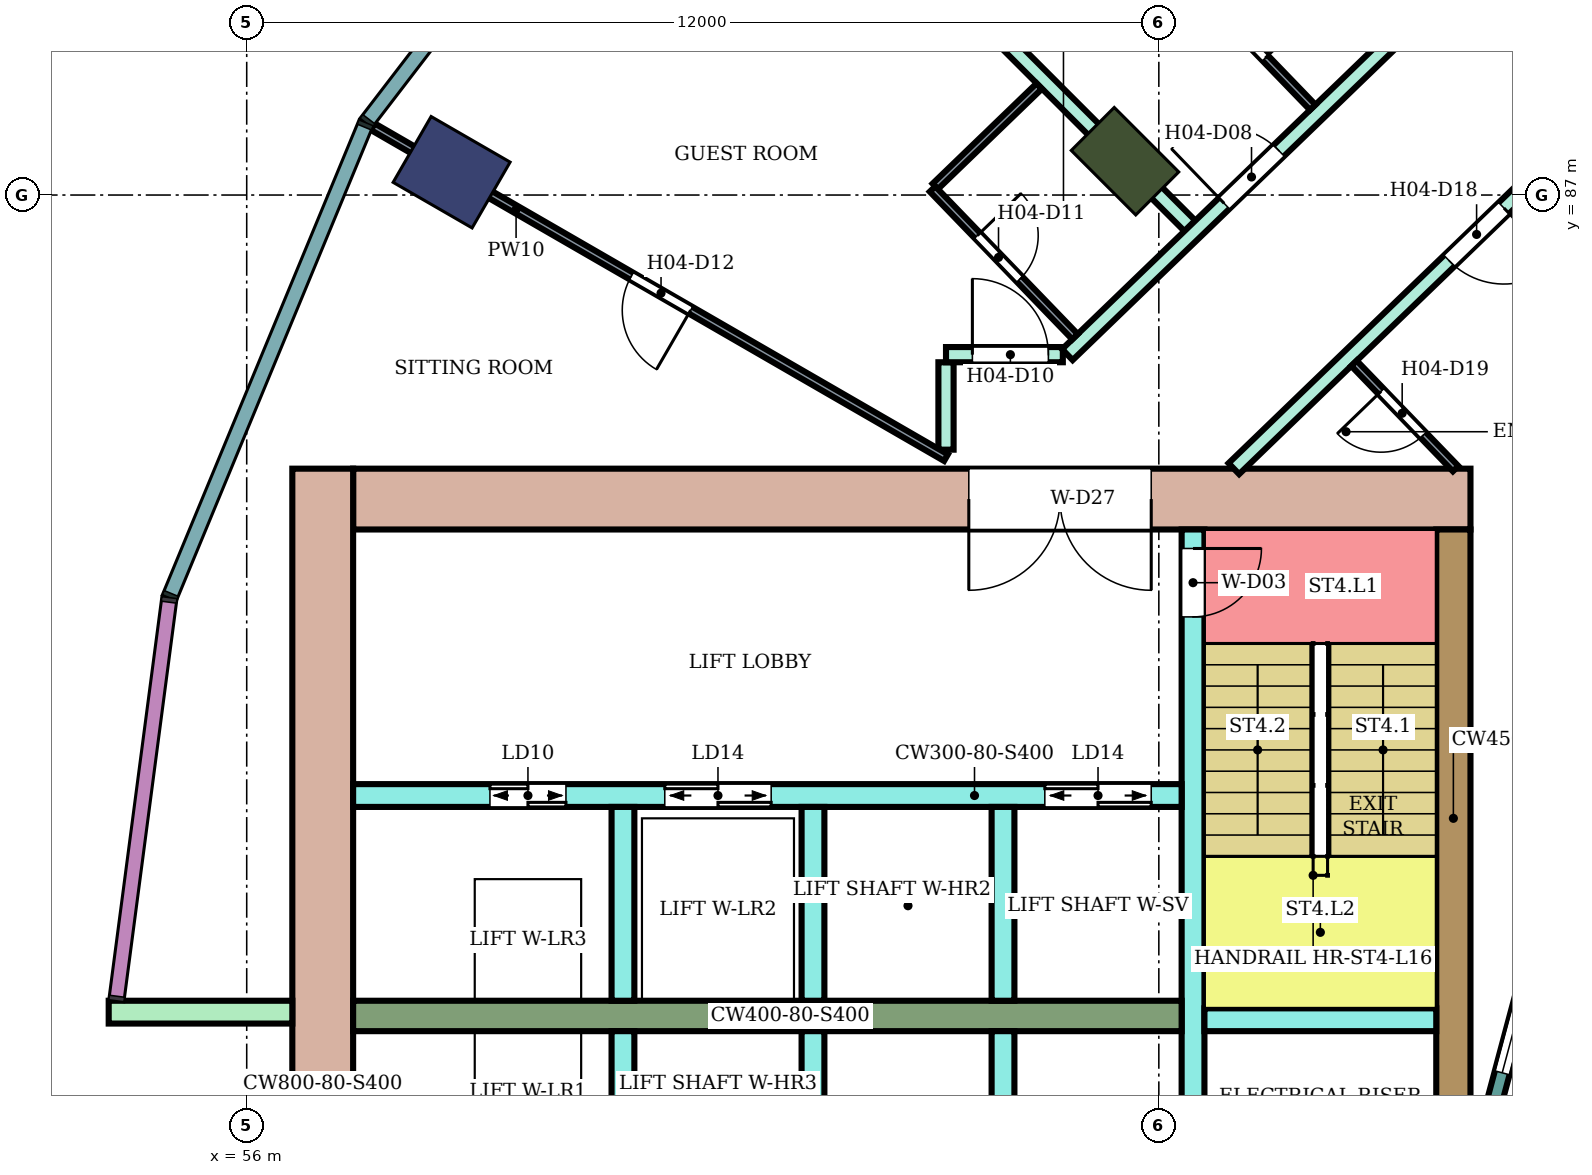
"""IFC4 building model, lengths in metres.
Left out: names, types, materials, properties, quantities, classifications, styles, units other than length and angle.
Written with IfcOpenShell. Run it as: python <this file> out.ifc"""

import sys

from ifc_helpers import new_model, si_unit, direction, frame, frame_2d, origin, origin_2d, place, context, subcontext, project, spatial, rectangle, extrude, element, fill, save


model = new_model("IFC4")
c1 = context("Model", 3, precision=1e-05, world=origin(), true_north=direction((0.0, 1.0)))
c2 = subcontext(c1, "Body", "Model", "MODEL_VIEW")
j1 = project(units=[si_unit("LENGTHUNIT", "METRE"), si_unit("PLANEANGLEUNIT", "RADIAN")], contexts=[c1])
p1 = place(None, origin())
s1 = spatial("IfcSite", under=j1, at=p1, CompositionType="ELEMENT")
p2 = place(p1, origin())
s2 = spatial("IfcBuilding", under=s1, at=p2, CompositionType="ELEMENT")
p3 = place(p2, frame((0.0, 0.0, 70.6)))
s3 = spatial("IfcBuildingStorey", under=s2, at=p3, CompositionType="ELEMENT", Elevation=70.6)
p4 = place(p3, frame((58.696, 87.3, 0.0), z_axis=(0.0, 0.0, 1.0), x_axis=(-0.866025403784, 0.5, 0.0)))
e1 = element("IfcColumn", 1, at=p4, inside=s3, PredefinedType="COLUMN", context=c2, shape_type="SweptSolid", body=[
    extrude(rectangle(XDim=1.2, YDim=1.0, at=origin_2d()), origin(), (0.0, 0.0, 1.0), 3.8),
])
p5 = place(p3, frame((67.555, 87.445, 0.0), z_axis=(0.0, 0.0, 1.0), x_axis=(-0.707106781187, 0.707106781187, 0.0)))
e2 = element("IfcColumn", 2, at=p5, inside=s3, PredefinedType="COLUMN", context=c2, shape_type="SweptSolid", body=[
    extrude(rectangle(XDim=1.2, YDim=0.8, at=origin_2d()), origin(), (0.0, 0.0, 1.0), 3.8),
])
p6 = place(p3, frame((72.1, 83.0, 0.0), z_axis=(0.0, 0.0, 1.0), x_axis=(-1.0, 0.0, 0.0)))
e3 = element("IfcWall", 3, at=p6, inside=s3, PredefinedType="SHEAR", context=c2, shape_type="SweptSolid", body=[
    extrude(rectangle(XDim=14.7, YDim=0.8, at=frame_2d((7.35, 0.0))), origin(), (0.0, 0.0, 1.0), 3.4),
])
p7 = place(p6, frame((4.2, 0.0, 0.0)))
e4 = element("IfcOpeningElement", 4, at=p7, cuts=e3, PredefinedType="OPENING", context=c2, shape_type="SweptSolid", body=[
    extrude(rectangle(XDim=2.4, YDim=2.4, at=frame_2d((1.2, 1.2))), frame((0.0, 0.41, 0.0), z_axis=(0.0, -1.0, 0.0), x_axis=(1.0, 0.0, 0.0)), (0.0, 0.0, 1.0), 0.82),
])
p8 = place(p3, frame((71.875, 82.6, 0.0), z_axis=(0.0, 0.0, 1.0), x_axis=(0.0, -1.0, 0.0)))
e5 = element("IfcWall", 5, at=p8, inside=s3, PredefinedType="SHEAR", context=c2, shape_type="SweptSolid", body=[
    extrude(rectangle(XDim=7.6, YDim=0.45, at=frame_2d((3.8, 0.0))), origin(), (0.0, 0.0, 1.0), 3.4),
])
p9 = place(p3, frame((57.0, 83.4, 0.0), z_axis=(0.0, 0.0, 1.0), x_axis=(0.0, -1.0, 0.0)))
e6 = element("IfcWall", 6, at=p9, inside=s3, PredefinedType="SHEAR", context=c2, shape_type="SweptSolid", body=[
    extrude(rectangle(XDim=16.8, YDim=0.8, at=frame_2d((8.4, 0.0))), origin(), (0.0, 0.0, 1.0), 3.4),
])
p10 = place(p3, frame((68.45, 82.6, 0.0), z_axis=(0.0, 0.0, 1.0), x_axis=(0.0, -1.0, 0.0)))
e7 = element("IfcWall", 7, at=p10, inside=s3, PredefinedType="SHEAR", context=c2, shape_type="SweptSolid", body=[
    extrude(rectangle(XDim=7.6, YDim=0.3, at=frame_2d((3.8, 0.0))), origin(), (0.0, 0.0, 1.0), 3.4),
])
p11 = place(p10, frame((0.25, 0.0, 0.0)))
e8 = element("IfcOpeningElement", 8, at=p11, cuts=e7, PredefinedType="OPENING", context=c2, shape_type="SweptSolid", body=[
    extrude(rectangle(XDim=0.9, YDim=2.1, at=frame_2d((0.45, 1.05))), frame((0.0, 0.16, 0.0), z_axis=(0.0, -1.0, 0.0), x_axis=(1.0, 0.0, 0.0)), (0.0, 0.0, 1.0), 0.32),
])
p12 = place(p3, frame((71.65, 76.15, 0.0), z_axis=(0.0, 0.0, 1.0), x_axis=(-1.0, 0.0, 0.0)))
e9 = element("IfcWall", 9, at=p12, inside=s3, PredefinedType="SHEAR", context=c2, shape_type="SweptSolid", body=[
    extrude(rectangle(XDim=3.05, YDim=0.3, at=frame_2d((1.525, 0.0))), origin(), (0.0, 0.0, 1.0), 3.4),
])
p13 = place(p3, frame((68.3, 76.2, 0.0), z_axis=(0.0, 0.0, 1.0), x_axis=(-1.0, 0.0, 0.0)))
e10 = element("IfcWall", 10, at=p13, inside=s3, PredefinedType="SHEAR", context=c2, shape_type="SweptSolid", body=[
    extrude(rectangle(XDim=10.9, YDim=0.4, at=frame_2d((5.45, 0.0))), origin(), (0.0, 0.0, 1.0), 3.4),
])
p14 = place(p3, frame((68.3, 79.1, 0.0), z_axis=(0.0, 0.0, 1.0), x_axis=(-1.0, 0.0, 0.0)))
e11 = element("IfcWall", 11, at=p14, inside=s3, PredefinedType="SHEAR", context=c2, shape_type="SweptSolid", body=[
    extrude(rectangle(XDim=10.9, YDim=0.3, at=frame_2d((5.45, 0.0))), origin(), (0.0, 0.0, 1.0), 3.4),
])
p15 = place(p14, frame((0.4, 0.0, 0.0)))
e12 = element("IfcOpeningElement", 12, at=p15, cuts=e11, PredefinedType="OPENING", context=c2, shape_type="SweptSolid", body=[
    extrude(rectangle(XDim=1.4, YDim=2.1, at=frame_2d((0.7, 1.05))), frame((0.0, 0.16, 0.0), z_axis=(0.0, -1.0, 0.0), x_axis=(1.0, 0.0, 0.0)), (0.0, 0.0, 1.0), 0.32),
])
p16 = place(p14, frame((5.4, 0.0, 0.0)))
e13 = element("IfcOpeningElement", 13, at=p16, cuts=e11, PredefinedType="OPENING", context=c2, shape_type="SweptSolid", body=[
    extrude(rectangle(XDim=1.4, YDim=2.1, at=frame_2d((0.7, 1.05))), frame((0.0, 0.16, 0.0), z_axis=(0.0, -1.0, 0.0), x_axis=(1.0, 0.0, 0.0)), (0.0, 0.0, 1.0), 0.32),
])
p17 = place(p14, frame((8.1, 0.0, 0.0)))
e14 = element("IfcOpeningElement", 14, at=p17, cuts=e11, PredefinedType="OPENING", context=c2, shape_type="SweptSolid", body=[
    extrude(rectangle(XDim=1.0, YDim=2.1, at=frame_2d((0.5, 1.05))), frame((0.0, 0.16, 0.0), z_axis=(0.0, -1.0, 0.0), x_axis=(1.0, 0.0, 0.0)), (0.0, 0.0, 1.0), 0.32),
])
for number, where, z_axis, x_axis in (
    (15, (65.95, 76.0, 0.0), (0.0, 0.0, 1.0), (0.0, -1.0, 0.0)),
    (16, (63.45, 76.0, 0.0), (0.0, 0.0, 1.0), (0.0, -1.0, 0.0)),
    (17, (60.95, 76.0, 0.0), (0.0, 0.0, 1.0), (0.0, -1.0, 0.0)),
    (18, (65.95, 78.95, 0.0), (0.0, 0.0, 1.0), (0.0, -1.0, 0.0)),
    (19, (63.45, 78.95, 0.0), (0.0, 0.0, 1.0), (0.0, -1.0, 0.0)),
    (20, (60.95, 78.95, 0.0), (0.0, 0.0, 1.0), (0.0, -1.0, 0.0)),
):
    element("IfcWall", number, at=place(p3, frame(where, z_axis=z_axis, x_axis=x_axis)), inside=s3, PredefinedType="SHEAR", context=c2, shape_type="SweptSolid", body=[
        extrude(rectangle(XDim=2.55, YDim=0.3, at=frame_2d((1.275, 0.0))), origin(), (0.0, 0.0, 1.0), 3.4),
    ])
p18 = place(p3, frame((56.6, 76.25, 0.0), z_axis=(0.0, 0.0, 1.0), x_axis=(-1.0, 0.0, 0.0)))
e21 = element("IfcWall", 21, at=p18, inside=s3, PredefinedType="NOTDEFINED", context=c2, shape_type="SweptSolid", body=[
    extrude(rectangle(XDim=2.416, YDim=0.3, at=frame_2d((1.208, 0.0))), origin(), (0.0, 0.0, 1.0), 3.8),
])
p19 = place(p3, frame((73.415, 78.802, 0.0), z_axis=(0.0, 0.0, 1.0), x_axis=(-0.258789828301, -0.965933654434, 0.0)))
e22 = element("IfcWall", 22, at=p19, inside=s3, PredefinedType="NOTDEFINED", context=c2, shape_type="SweptSolid", body=[
    extrude(rectangle(XDim=3.936, YDim=0.2, at=frame_2d((1.968, 0.0))), origin(), (0.0, 0.0, 1.0), 3.8),
])
p20 = place(p19, frame((0.468, 0.0, 0.9)))
e23 = element("IfcOpeningElement", 23, at=p20, cuts=e22, PredefinedType="OPENING", context=c2, shape_type="SweptSolid", body=[
    extrude(rectangle(XDim=3.0, YDim=2.3, at=frame_2d((1.5, 1.15))), frame((0.0, 0.11, 0.0), z_axis=(0.0, -1.0, 0.0), x_axis=(1.0, 0.0, 0.0)), (0.0, 0.0, 1.0), 0.22),
])
p21 = place(p3, frame((63.598, 91.407, 0.0), z_axis=(0.0, 0.0, 1.0), x_axis=(0.706981202484, -0.707232337591, 0.0)))
e24 = element("IfcWall", 24, at=p21, inside=s3, PredefinedType="PARTITIONING", context=c2, shape_type="SweptSolid", body=[
    extrude(rectangle(XDim=6.805, YDim=0.2, at=frame_2d((3.402, 0.0))), origin(), (0.0, 0.0, 1.0), 3.35),
])
p22 = place(p3, frame((65.2, 83.65, 0.0), z_axis=(0.0, 0.0, 1.0), x_axis=(0.0, 1.0, 0.0)))
e25 = element("IfcWall", 25, at=p22, inside=s3, PredefinedType="PARTITIONING", context=c2, shape_type="SweptSolid", body=[
    extrude(rectangle(XDim=1.15, YDim=0.2, at=frame_2d((0.575, 0.0))), origin(), (0.0, 0.0, 1.0), 3.35),
])
p23 = place(p3, frame((65.2, 84.9, 0.0), z_axis=(0.0, 0.0, 1.0), x_axis=(1.0, 0.0, 0.0)))
e26 = element("IfcWall", 26, at=p23, inside=s3, PredefinedType="PARTITIONING", context=c2, shape_type="SweptSolid", body=[
    extrude(rectangle(XDim=1.537, YDim=0.2, at=frame_2d((0.769, 0.0))), origin(), (0.0, 0.0, 1.0), 3.35),
])
p24 = place(p23, frame((0.347, 0.0, 0.0)))
e27 = element("IfcOpeningElement", 27, at=p24, cuts=e26, PredefinedType="OPENING", context=c2, shape_type="SweptSolid", body=[
    extrude(rectangle(XDim=1.0, YDim=2.1, at=frame_2d((0.5, 1.05))), frame((0.0, 0.11, 0.0), z_axis=(0.0, -1.0, 0.0), x_axis=(1.0, 0.0, 0.0)), (0.0, 0.0, 1.0), 0.22),
])
p25 = place(p3, frame((66.797, 84.9, 0.0), z_axis=(0.0, 0.0, 1.0), x_axis=(0.719692092412, 0.694293376116, 0.0)))
e28 = element("IfcWall", 28, at=p25, inside=s3, PredefinedType="PARTITIONING", context=c2, shape_type="SweptSolid", body=[
    extrude(rectangle(XDim=6.584, YDim=0.2, at=frame_2d((3.292, 0.0))), origin(), (0.0, 0.0, 1.0), 3.35),
])
p26 = place(p25, frame((2.866, 0.0, 0.0)))
e29 = element("IfcOpeningElement", 29, at=p26, cuts=e28, PredefinedType="OPENING", context=c2, shape_type="SweptSolid", body=[
    extrude(rectangle(XDim=1.0, YDim=2.1, at=frame_2d((0.5, 1.05))), frame((0.0, 0.11, 0.0), z_axis=(0.0, -1.0, 0.0), x_axis=(1.0, 0.0, 0.0)), (0.0, 0.0, 1.0), 0.22),
])
p27 = place(p3, frame((68.987, 83.4, 0.0), z_axis=(0.0, 0.0, 1.0), x_axis=(0.719591503389, 0.694397629784, 0.0)))
e30 = element("IfcWall", 30, at=p27, inside=s3, PredefinedType="PARTITIONING", context=c2, shape_type="SweptSolid", body=[
    extrude(rectangle(XDim=5.378, YDim=0.2, at=frame_2d((2.689, 0.0))), origin(), (0.0, 0.0, 1.0), 3.35),
])
p28 = place(p27, frame((3.938, 0.0, 0.0)))
e31 = element("IfcOpeningElement", 31, at=p28, cuts=e30, PredefinedType="OPENING", context=c2, shape_type="SweptSolid", body=[
    extrude(rectangle(XDim=1.0, YDim=2.1, at=frame_2d((0.5, 1.05))), frame((0.0, 0.11, 0.0), z_axis=(0.0, -1.0, 0.0), x_axis=(1.0, 0.0, 0.0)), (0.0, 0.0, 1.0), 0.22),
])
p29 = place(p3, frame((57.659, 87.899, 0.0), z_axis=(0.0, 0.0, 1.0), x_axis=(0.86602264145, -0.500004784474, 0.0)))
e32 = element("IfcWall", 32, at=p29, inside=s3, PredefinedType="PARTITIONING", context=c2, shape_type="SweptSolid", body=[
    extrude(rectangle(XDim=8.708, YDim=0.1, at=frame_2d((4.354, 0.0))), origin(), (0.0, 0.0, 1.0), 3.35),
])
p30 = place(p29, frame((3.929, 0.0, 0.0)))
e33 = element("IfcOpeningElement", 33, at=p30, cuts=e32, PredefinedType="OPENING", context=c2, shape_type="SweptSolid", body=[
    extrude(rectangle(XDim=0.9, YDim=2.1, at=frame_2d((0.45, 1.05))), frame((0.0, 0.06, 0.0), z_axis=(0.0, -1.0, 0.0), x_axis=(1.0, 0.0, 0.0)), (0.0, 0.0, 1.0), 0.12),
])
p31 = place(p3, frame((65.059, 87.114, 0.0), z_axis=(0.0, 0.0, 1.0), x_axis=(0.719715847356, 0.694268751324, 0.0)))
e34 = element("IfcWall", 34, at=p31, inside=s3, PredefinedType="PARTITIONING", context=c2, shape_type="SweptSolid", body=[
    extrude(rectangle(XDim=1.9, YDim=0.1, at=frame_2d((0.95, 0.0))), origin(), (0.0, 0.0, 1.0), 3.35),
])
p32 = place(p3, frame((65.023, 87.079, 0.0), z_axis=(0.0, 0.0, 1.0), x_axis=(0.694287838235, -0.719697434815, 0.0)))
e35 = element("IfcWall", 35, at=p32, inside=s3, PredefinedType="PARTITIONING", context=c2, shape_type="SweptSolid", body=[
    extrude(rectangle(XDim=2.7, YDim=0.1, at=frame_2d((1.35, 0.0))), origin(), (0.0, 0.0, 1.0), 3.35),
])
p33 = place(p32, frame((0.85, 0.0, 0.0)))
e36 = element("IfcOpeningElement", 36, at=p33, cuts=e35, PredefinedType="OPENING", context=c2, shape_type="SweptSolid", body=[
    extrude(rectangle(XDim=0.8, YDim=2.1, at=frame_2d((0.4, 1.05))), frame((0.0, 0.06, 0.0), z_axis=(0.0, -1.0, 0.0), x_axis=(1.0, 0.0, 0.0)), (0.0, 0.0, 1.0), 0.12),
])
p34 = place(p3, frame((68.185, 90.06, 0.0), z_axis=(0.0, 0.0, 1.0), x_axis=(0.69446127412, -0.719530081892, 0.0)))
e37 = element("IfcWall", 37, at=p34, inside=s3, PredefinedType="PARTITIONING", context=c2, shape_type="SweptSolid", body=[
    extrude(rectangle(XDim=2.649, YDim=0.1, at=frame_2d((1.324, 0.0))), origin(), (0.0, 0.0, 1.0), 3.35),
])
p35 = place(p34, frame((0.95, 0.0, 0.0)))
e38 = element("IfcOpeningElement", 38, at=p35, cuts=e37, PredefinedType="OPENING", context=c2, shape_type="SweptSolid", body=[
    extrude(rectangle(XDim=0.8, YDim=2.1, at=frame_2d((0.4, 1.05))), frame((0.0, 0.06, 0.0), z_axis=(0.0, -1.0, 0.0), x_axis=(1.0, 0.0, 0.0)), (0.0, 0.0, 1.0), 0.12),
])
p36 = place(p3, frame((70.567, 84.786, 0.0), z_axis=(0.0, 0.0, 1.0), x_axis=(0.694447472534, -0.719543402368, 0.0)))
e39 = element("IfcWall", 39, at=p36, inside=s3, PredefinedType="PARTITIONING", context=c2, shape_type="SweptSolid", body=[
    extrude(rectangle(XDim=1.926, YDim=0.1, at=frame_2d((0.963, 0.0))), origin(), (0.0, 0.0, 1.0), 3.35),
])
p37 = place(p36, frame((0.513, 0.0, 0.0)))
e40 = element("IfcOpeningElement", 40, at=p37, cuts=e39, PredefinedType="OPENING", context=c2, shape_type="SweptSolid", body=[
    extrude(rectangle(XDim=0.8, YDim=2.1, at=frame_2d((0.4, 1.05))), frame((0.0, 0.06, 0.0), z_axis=(0.0, -1.0, 0.0), x_axis=(1.0, 0.0, 0.0)), (0.0, 0.0, 1.0), 0.12),
])
p38 = place(p20, origin())
e41 = element("IfcWindow", 41, at=p38, inside=s3, PartitioningType="SINGLE_PANEL", PredefinedType="WINDOW", context=c2, shape_type="SweptSolid", body=[
    extrude(rectangle(XDim=3.0, YDim=2.3, at=frame_2d((1.5, 1.15))), frame((0.0, 0.03, 0.0), z_axis=(0.0, -1.0, 0.0), x_axis=(1.0, 0.0, 0.0)), (0.0, 0.0, 1.0), 0.06),
])
fill(e23, e41)
p39 = place(p26, origin())
e42 = element("IfcDoor", 42, at=p39, inside=s3, OperationType="SINGLE_SWING_LEFT", PredefinedType="DOOR", context=c2, shape_type="SweptSolid", body=[
    extrude(rectangle(XDim=1.0, YDim=2.1, at=frame_2d((0.5, 1.05))), frame((0.0, 0.025, 0.0), z_axis=(0.0, -1.0, 0.0), x_axis=(1.0, 0.0, 0.0)), (0.0, 0.0, 1.0), 0.05),
])
fill(e29, e42)
p40 = place(p35, origin())
e43 = element("IfcDoor", 43, at=p40, inside=s3, OperationType="SINGLE_SWING_RIGHT", PredefinedType="DOOR", context=c2, shape_type="SweptSolid", body=[
    extrude(rectangle(XDim=0.8, YDim=2.1, at=frame_2d((0.4, 1.05))), frame((0.0, 0.025, 0.0), z_axis=(0.0, -1.0, 0.0), x_axis=(1.0, 0.0, 0.0)), (0.0, 0.0, 1.0), 0.05),
])
fill(e38, e43)
p41 = place(p24, origin())
e44 = element("IfcDoor", 44, at=p41, inside=s3, OperationType="SINGLE_SWING_LEFT", PredefinedType="DOOR", context=c2, shape_type="SweptSolid", body=[
    extrude(rectangle(XDim=1.0, YDim=2.1, at=frame_2d((0.5, 1.05))), frame((0.0, 0.025, 0.0), z_axis=(0.0, -1.0, 0.0), x_axis=(1.0, 0.0, 0.0)), (0.0, 0.0, 1.0), 0.05),
])
fill(e27, e44)
p42 = place(p33, origin())
e45 = element("IfcDoor", 45, at=p42, inside=s3, OperationType="SINGLE_SWING_LEFT", PredefinedType="DOOR", context=c2, shape_type="SweptSolid", body=[
    extrude(rectangle(XDim=0.8, YDim=2.1, at=frame_2d((0.4, 1.05))), frame((0.0, 0.025, 0.0), z_axis=(0.0, -1.0, 0.0), x_axis=(1.0, 0.0, 0.0)), (0.0, 0.0, 1.0), 0.05),
])
fill(e36, e45)
p43 = place(p30, frame((0.9, 0.0, 0.0), z_axis=(0.0, 0.0, 1.0), x_axis=(-1.0, 0.0, 0.0)))
e46 = element("IfcDoor", 46, at=p43, inside=s3, OperationType="SINGLE_SWING_LEFT", PredefinedType="DOOR", context=c2, shape_type="SweptSolid", body=[
    extrude(rectangle(XDim=0.9, YDim=2.1, at=frame_2d((0.45, 1.05))), frame((0.0, 0.025, 0.0), z_axis=(0.0, -1.0, 0.0), x_axis=(1.0, 0.0, 0.0)), (0.0, 0.0, 1.0), 0.05),
])
fill(e33, e46)
p44 = place(p28, frame((1.0, 0.0, 0.0), z_axis=(0.0, 0.0, 1.0), x_axis=(-1.0, 0.0, 0.0)))
e47 = element("IfcDoor", 47, at=p44, inside=s3, OperationType="SINGLE_SWING_LEFT", PredefinedType="DOOR", context=c2, shape_type="SweptSolid", body=[
    extrude(rectangle(XDim=1.0, YDim=2.1, at=frame_2d((0.5, 1.05))), frame((0.0, 0.025, 0.0), z_axis=(0.0, -1.0, 0.0), x_axis=(1.0, 0.0, 0.0)), (0.0, 0.0, 1.0), 0.05),
])
fill(e31, e47)
p45 = place(p37, frame((0.8, 0.0, 0.0), z_axis=(0.0, 0.0, 1.0), x_axis=(-1.0, 0.0, 0.0)))
e48 = element("IfcDoor", 48, at=p45, inside=s3, OperationType="SINGLE_SWING_RIGHT", PredefinedType="DOOR", context=c2, shape_type="SweptSolid", body=[
    extrude(rectangle(XDim=0.8, YDim=2.1, at=frame_2d((0.4, 1.05))), frame((0.0, 0.025, 0.0), z_axis=(0.0, -1.0, 0.0), x_axis=(1.0, 0.0, 0.0)), (0.0, 0.0, 1.0), 0.05),
])
fill(e40, e48)
p46 = place(p11, origin())
e49 = element("IfcDoor", 49, at=p46, inside=s3, OperationType="SINGLE_SWING_LEFT", PredefinedType="DOOR", context=c2, shape_type="SweptSolid", body=[
    extrude(rectangle(XDim=0.9, YDim=2.1, at=frame_2d((0.45, 1.05))), frame((0.0, 0.025, 0.0), z_axis=(0.0, -1.0, 0.0), x_axis=(1.0, 0.0, 0.0)), (0.0, 0.0, 1.0), 0.05),
])
fill(e8, e49)
p47 = place(p15, origin())
e50 = element("IfcDoor", 50, at=p47, inside=s3, OperationType="DOUBLE_DOOR_SLIDING", PredefinedType="DOOR", context=c2, shape_type="SweptSolid", body=[
    extrude(rectangle(XDim=1.4, YDim=2.1, at=frame_2d((0.7, 1.05))), frame((0.0, 0.025, 0.0), z_axis=(0.0, -1.0, 0.0), x_axis=(1.0, 0.0, 0.0)), (0.0, 0.0, 1.0), 0.05),
])
fill(e12, e50)
p48 = place(p16, origin())
e51 = element("IfcDoor", 51, at=p48, inside=s3, OperationType="DOUBLE_DOOR_SLIDING", PredefinedType="DOOR", context=c2, shape_type="SweptSolid", body=[
    extrude(rectangle(XDim=1.4, YDim=2.1, at=frame_2d((0.7, 1.05))), frame((0.0, 0.025, 0.0), z_axis=(0.0, -1.0, 0.0), x_axis=(1.0, 0.0, 0.0)), (0.0, 0.0, 1.0), 0.05),
])
fill(e13, e51)
p49 = place(p17, origin())
e52 = element("IfcDoor", 52, at=p49, inside=s3, OperationType="DOUBLE_DOOR_SLIDING", PredefinedType="DOOR", context=c2, shape_type="SweptSolid", body=[
    extrude(rectangle(XDim=1.0, YDim=2.1, at=frame_2d((0.5, 1.05))), frame((0.0, 0.025, 0.0), z_axis=(0.0, -1.0, 0.0), x_axis=(1.0, 0.0, 0.0)), (0.0, 0.0, 1.0), 0.05),
])
fill(e14, e52)
p50 = place(p7, origin())
e53 = element("IfcDoor", 53, at=p50, inside=s3, OperationType="DOUBLE_DOOR_SINGLE_SWING", PredefinedType="DOOR", context=c2, shape_type="SweptSolid", body=[
    extrude(rectangle(XDim=2.4, YDim=2.4, at=frame_2d((1.2, 1.2))), frame((0.0, 0.025, 0.0), z_axis=(0.0, -1.0, 0.0), x_axis=(1.0, 0.0, 0.0)), (0.0, 0.0, 1.0), 0.05),
])
fill(e4, e53)
save(model, sys.argv[1])
